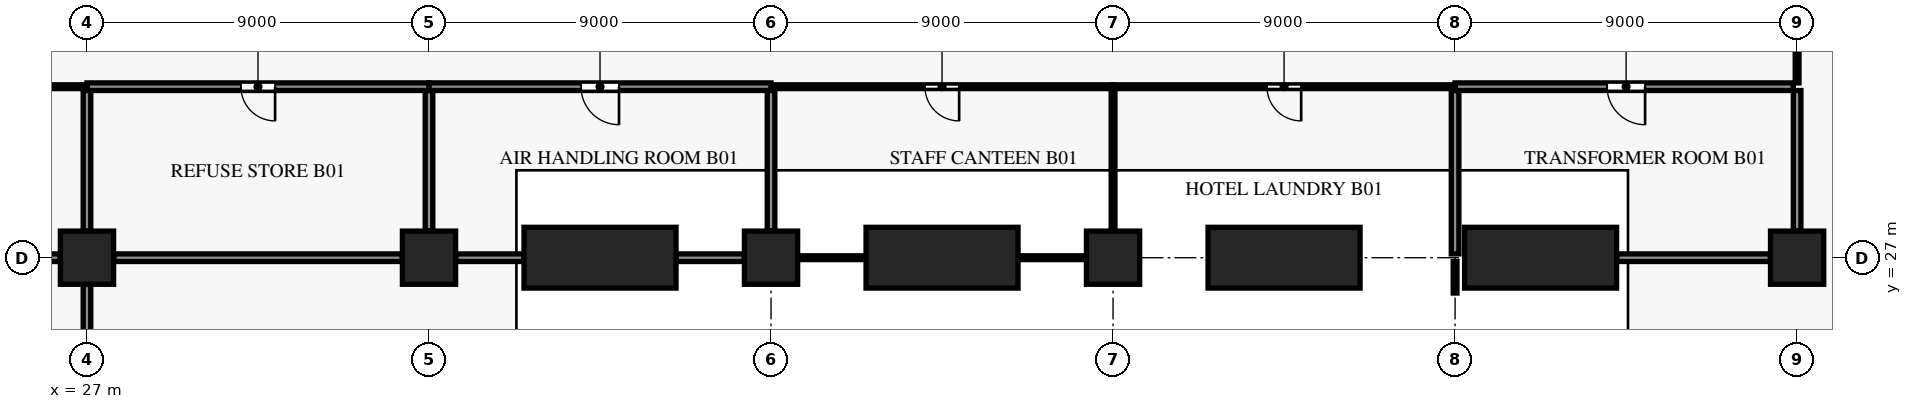
"""IFC4 building model, lengths in metres.
Left out: names, types, materials, properties, quantities, classifications, styles, units other than length and angle.
Written with IfcOpenShell. Run it as: python <this file> out.ifc"""

import sys

from ifc_helpers import new_model, si_unit, direction, frame, frame_2d, origin, origin_2d, place, context, subcontext, project, spatial, rectangle, extrude, element, fill, save


model = new_model("IFC4")
c1 = context("Model", 3, precision=1e-05, world=origin(), true_north=direction((0.0, 1.0)))
c2 = subcontext(c1, "Body", "Model", "MODEL_VIEW")
j1 = project(units=[si_unit("LENGTHUNIT", "METRE"), si_unit("PLANEANGLEUNIT", "RADIAN")], contexts=[c1])
p1 = place(None, origin())
s1 = spatial("IfcSite", under=j1, at=p1, CompositionType="ELEMENT")
p2 = place(p1, origin())
s2 = spatial("IfcBuilding", under=s1, at=p2, CompositionType="ELEMENT")
p3 = place(p2, frame((0.0, 0.0, -6.0)))
s3 = spatial("IfcBuildingStorey", under=s2, at=p3, CompositionType="ELEMENT", Elevation=-6.0)
p4 = place(p3, frame((27.0, 27.0, 0.0), z_axis=(0.0, 0.0, 1.0), x_axis=(1.0, 0.0, 0.0)))
e1 = element("IfcColumn", 1, at=p4, inside=s3, PredefinedType="COLUMN", context=c2, shape_type="SweptSolid", body=[
    extrude(rectangle(XDim=1.4, YDim=1.4, at=origin_2d()), origin(), (0.0, 0.0, 1.0), 6.0),
])
for number, where, z_axis, x_axis in (
    (2, (40.5, 27.0, 0.0), (0.0, 0.0, 1.0), (1.0, 0.0, 0.0)),
    (3, (49.5, 27.0, 0.0), (0.0, 0.0, 1.0), (1.0, 0.0, 0.0)),
    (4, (58.5, 27.0, 0.0), (0.0, 0.0, 1.0), (1.0, 0.0, 0.0)),
    (5, (65.25, 27.0, 0.0), (0.0, 0.0, 1.0), (1.0, 0.0, 0.0)),
):
    element("IfcColumn", number, at=place(p3, frame(where, z_axis=z_axis, x_axis=x_axis)), inside=s3, PredefinedType="COLUMN", context=c2, shape_type="SweptSolid", body=[
        extrude(rectangle(XDim=4.0, YDim=1.6, at=origin_2d()), origin(), (0.0, 0.0, 1.0), 6.0),
    ])
for number, where, z_axis, x_axis in (
    (6, (36.0, 27.0, 0.0), (0.0, 0.0, 1.0), (1.0, 0.0, 0.0)),
    (7, (45.0, 27.0, 0.0), (0.0, 0.0, 1.0), (1.0, 0.0, 0.0)),
    (8, (54.0, 27.0, 0.0), (0.0, 0.0, 1.0), (1.0, 0.0, 0.0)),
    (9, (72.0, 27.0, 0.0), (0.0, 0.0, 1.0), (1.0, 0.0, 0.0)),
):
    element("IfcColumn", number, at=place(p3, frame(where, z_axis=z_axis, x_axis=x_axis)), inside=s3, PredefinedType="COLUMN", context=c2, shape_type="SweptSolid", body=[
        extrude(rectangle(XDim=1.4, YDim=1.4, at=origin_2d()), origin(), (0.0, 0.0, 1.0), 6.0),
    ])
p5 = place(p3, frame((27.0, 26.295, 0.0), z_axis=(0.0, 0.0, 1.0), x_axis=(0.0, -1.0, 0.0)))
e10 = element("IfcWall", 10, at=p5, inside=s3, PredefinedType="PARTITIONING", context=c2, shape_type="SweptSolid", body=[
    extrude(rectangle(XDim=7.59, YDim=0.2, at=frame_2d((3.795, 0.0))), origin(), (0.0, 0.0, 1.0), 5.58),
])
p6 = place(p3, frame((63.0, 26.9, 0.0), z_axis=(0.0, 0.0, 1.0), x_axis=(0.0, -1.0, 0.0)))
e11 = element("IfcWall", 11, at=p6, inside=s3, PredefinedType="PARTITIONING", context=c2, shape_type="SweptSolid", body=[
    extrude(rectangle(XDim=0.83, YDim=0.1, at=frame_2d((0.415, 0.0))), origin(), (0.0, 0.0, 1.0), 5.58),
])
p7 = place(p3, frame((20.7, 27.0, 0.0), z_axis=(0.0, 0.0, 1.0), x_axis=(1.0, 0.0, 0.0)))
e12 = element("IfcWall", 12, at=p7, inside=s3, PredefinedType="PARTITIONING", context=c2, shape_type="SweptSolid", body=[
    extrude(rectangle(XDim=5.595, YDim=0.2, at=frame_2d((2.797, 0.0))), origin(), (0.0, 0.0, 1.0), 5.58),
])
p8 = place(p3, frame((35.295, 27.0, 0.0), z_axis=(0.0, 0.0, 1.0), x_axis=(-1.0, 0.0, 0.0)))
e13 = element("IfcWall", 13, at=p8, inside=s3, PredefinedType="PARTITIONING", context=c2, shape_type="SweptSolid", body=[
    extrude(rectangle(XDim=7.59, YDim=0.2, at=frame_2d((3.795, 0.0))), origin(), (0.0, 0.0, 1.0), 5.58),
])
for number, where, z_axis, x_axis in (
    (14, (38.495, 27.0, 0.0), (0.0, 0.0, 1.0), (-1.0, 0.0, 0.0)),
    (15, (44.295, 27.0, 0.0), (0.0, 0.0, 1.0), (-1.0, 0.0, 0.0)),
):
    element("IfcWall", number, at=place(p3, frame(where, z_axis=z_axis, x_axis=x_axis)), inside=s3, PredefinedType="PARTITIONING", context=c2, shape_type="SweptSolid", body=[
        extrude(rectangle(XDim=1.79, YDim=0.2, at=frame_2d((0.895, 0.0))), origin(), (0.0, 0.0, 1.0), 5.58),
    ])
for number, where, z_axis, x_axis in (
    (16, (47.495, 27.0, 0.0), (0.0, 0.0, 1.0), (-1.0, 0.0, 0.0)),
    (17, (53.295, 27.0, 0.0), (0.0, 0.0, 1.0), (-1.0, 0.0, 0.0)),
):
    element("IfcWall", number, at=place(p3, frame(where, z_axis=z_axis, x_axis=x_axis)), inside=s3, PredefinedType="PARTITIONING", context=c2, shape_type="SweptSolid", body=[
        extrude(rectangle(XDim=1.79, YDim=0.1, at=frame_2d((0.895, 0.0))), origin(), (0.0, 0.0, 1.0), 5.58),
    ])
p9 = place(p3, frame((71.295, 27.0, 0.0), z_axis=(0.0, 0.0, 1.0), x_axis=(-1.0, 0.0, 0.0)))
e18 = element("IfcWall", 18, at=p9, inside=s3, PredefinedType="PARTITIONING", context=c2, shape_type="SweptSolid", body=[
    extrude(rectangle(XDim=4.04, YDim=0.2, at=frame_2d((2.02, 0.0))), origin(), (0.0, 0.0, 1.0), 5.58),
])
p10 = place(p3, frame((27.0, 27.705, 0.0), z_axis=(0.0, 0.0, 1.0), x_axis=(0.0, 1.0, 0.0)))
e19 = element("IfcWall", 19, at=p10, inside=s3, PredefinedType="PARTITIONING", context=c2, shape_type="SweptSolid", body=[
    extrude(rectangle(XDim=3.695, YDim=0.2, at=frame_2d((1.847, 0.0))), origin(), (0.0, 0.0, 1.0), 5.58),
])
p11 = place(p3, frame((54.0, 27.705, 0.0), z_axis=(0.0, 0.0, 1.0), x_axis=(0.0, 1.0, 0.0)))
e20 = element("IfcWall", 20, at=p11, inside=s3, PredefinedType="PARTITIONING", context=c2, shape_type="SweptSolid", body=[
    extrude(rectangle(XDim=3.745, YDim=0.1, at=frame_2d((1.873, 0.0))), origin(), (0.0, 0.0, 1.0), 5.58),
])
for number, where, z_axis, x_axis in (
    (21, (36.0, 31.4, 0.0), (0.0, 0.0, 1.0), (0.0, -1.0, 0.0)),
    (22, (45.0, 31.4, 0.0), (0.0, 0.0, 1.0), (0.0, -1.0, 0.0)),
):
    element("IfcWall", number, at=place(p3, frame(where, z_axis=z_axis, x_axis=x_axis)), inside=s3, PredefinedType="PARTITIONING", context=c2, shape_type="SweptSolid", body=[
        extrude(rectangle(XDim=3.695, YDim=0.2, at=frame_2d((1.847, 0.0))), origin(), (0.0, 0.0, 1.0), 5.58),
    ])
p12 = place(p3, frame((63.0, 31.4, 0.0), z_axis=(0.0, 0.0, 1.0), x_axis=(0.0, -1.0, 0.0)))
e23 = element("IfcWall", 23, at=p12, inside=s3, PredefinedType="PARTITIONING", context=c2, shape_type="SweptSolid", body=[
    extrude(rectangle(XDim=4.3, YDim=0.2, at=frame_2d((2.15, 0.0))), origin(), (0.0, 0.0, 1.0), 5.58),
])
p13 = place(p3, frame((72.0, 31.4, 0.0), z_axis=(0.0, 0.0, 1.0), x_axis=(0.0, -1.0, 0.0)))
e24 = element("IfcWall", 24, at=p13, inside=s3, PredefinedType="PARTITIONING", context=c2, shape_type="SweptSolid", body=[
    extrude(rectangle(XDim=3.695, YDim=0.2, at=frame_2d((1.847, 0.0))), origin(), (0.0, 0.0, 1.0), 5.58),
])
p14 = place(p3, frame((27.0, 31.5, 0.0), z_axis=(0.0, 0.0, 1.0), x_axis=(-1.0, 0.0, 0.0)))
e25 = element("IfcWall", 25, at=p14, inside=s3, PredefinedType="PARTITIONING", context=c2, shape_type="SweptSolid", body=[
    extrude(rectangle(XDim=6.45, YDim=0.1, at=frame_2d((3.225, 0.0))), origin(), (0.0, 0.0, 1.0), 5.58),
])
p15 = place(p14, frame((2.75, 0.0, 0.0)))
e26 = element("IfcOpeningElement", 26, at=p15, cuts=e25, PredefinedType="OPENING", context=c2, shape_type="SweptSolid", body=[
    extrude(rectangle(XDim=0.9, YDim=2.1, at=frame_2d((0.45, 1.05))), frame((0.0, 0.06, 0.0), z_axis=(0.0, -1.0, 0.0), x_axis=(1.0, 0.0, 0.0)), (0.0, 0.0, 1.0), 0.12),
])
p16 = place(p3, frame((36.0, 31.5, 0.0), z_axis=(0.0, 0.0, 1.0), x_axis=(-1.0, 0.0, 0.0)))
e27 = element("IfcWall", 27, at=p16, inside=s3, PredefinedType="PARTITIONING", context=c2, shape_type="SweptSolid", body=[
    extrude(rectangle(XDim=9.0, YDim=0.2, at=frame_2d((4.5, 0.0))), origin(), (0.0, 0.0, 1.0), 5.58),
])
p17 = place(p16, frame((4.05, 0.0, 0.0)))
e28 = element("IfcOpeningElement", 28, at=p17, cuts=e27, PredefinedType="OPENING", context=c2, shape_type="SweptSolid", body=[
    extrude(rectangle(XDim=0.9, YDim=2.1, at=frame_2d((0.45, 1.05))), frame((0.0, 0.11, 0.0), z_axis=(0.0, -1.0, 0.0), x_axis=(1.0, 0.0, 0.0)), (0.0, 0.0, 1.0), 0.22),
])
p18 = place(p3, frame((45.0, 31.5, 0.0), z_axis=(0.0, 0.0, 1.0), x_axis=(-1.0, 0.0, 0.0)))
e29 = element("IfcWall", 29, at=p18, inside=s3, PredefinedType="PARTITIONING", context=c2, shape_type="SweptSolid", body=[
    extrude(rectangle(XDim=9.0, YDim=0.2, at=frame_2d((4.5, 0.0))), origin(), (0.0, 0.0, 1.0), 5.58),
])
p19 = place(p18, frame((4.0, 0.0, 0.0)))
e30 = element("IfcOpeningElement", 30, at=p19, cuts=e29, PredefinedType="OPENING", context=c2, shape_type="SweptSolid", body=[
    extrude(rectangle(XDim=1.0, YDim=2.1, at=frame_2d((0.5, 1.05))), frame((0.0, 0.11, 0.0), z_axis=(0.0, -1.0, 0.0), x_axis=(1.0, 0.0, 0.0)), (0.0, 0.0, 1.0), 0.22),
])
p20 = place(p3, frame((54.0, 31.5, 0.0), z_axis=(0.0, 0.0, 1.0), x_axis=(-1.0, 0.0, 0.0)))
e31 = element("IfcWall", 31, at=p20, inside=s3, PredefinedType="PARTITIONING", context=c2, shape_type="SweptSolid", body=[
    extrude(rectangle(XDim=9.0, YDim=0.1, at=frame_2d((4.5, 0.0))), origin(), (0.0, 0.0, 1.0), 5.58),
])
p21 = place(p20, frame((4.05, 0.0, 0.0)))
e32 = element("IfcOpeningElement", 32, at=p21, cuts=e31, PredefinedType="OPENING", context=c2, shape_type="SweptSolid", body=[
    extrude(rectangle(XDim=0.9, YDim=2.1, at=frame_2d((0.45, 1.05))), frame((0.0, 0.06, 0.0), z_axis=(0.0, -1.0, 0.0), x_axis=(1.0, 0.0, 0.0)), (0.0, 0.0, 1.0), 0.12),
])
p22 = place(p3, frame((63.0, 31.5, 0.0), z_axis=(0.0, 0.0, 1.0), x_axis=(-1.0, 0.0, 0.0)))
e33 = element("IfcWall", 33, at=p22, inside=s3, PredefinedType="PARTITIONING", context=c2, shape_type="SweptSolid", body=[
    extrude(rectangle(XDim=9.0, YDim=0.1, at=frame_2d((4.5, 0.0))), origin(), (0.0, 0.0, 1.0), 5.58),
])
p23 = place(p22, frame((4.05, 0.0, 0.0)))
e34 = element("IfcOpeningElement", 34, at=p23, cuts=e33, PredefinedType="OPENING", context=c2, shape_type="SweptSolid", body=[
    extrude(rectangle(XDim=0.9, YDim=2.1, at=frame_2d((0.45, 1.05))), frame((0.0, 0.06, 0.0), z_axis=(0.0, -1.0, 0.0), x_axis=(1.0, 0.0, 0.0)), (0.0, 0.0, 1.0), 0.12),
])
p24 = place(p3, frame((71.9, 31.5, 0.0), z_axis=(0.0, 0.0, 1.0), x_axis=(-1.0, 0.0, 0.0)))
e35 = element("IfcWall", 35, at=p24, inside=s3, PredefinedType="PARTITIONING", context=c2, shape_type="SweptSolid", body=[
    extrude(rectangle(XDim=8.9, YDim=0.2, at=frame_2d((4.45, 0.0))), origin(), (0.0, 0.0, 1.0), 5.58),
])
p25 = place(p24, frame((3.9, 0.0, 0.0)))
e36 = element("IfcOpeningElement", 36, at=p25, cuts=e35, PredefinedType="OPENING", context=c2, shape_type="SweptSolid", body=[
    extrude(rectangle(XDim=1.0, YDim=2.1, at=frame_2d((0.5, 1.05))), frame((0.0, 0.11, 0.0), z_axis=(0.0, -1.0, 0.0), x_axis=(1.0, 0.0, 0.0)), (0.0, 0.0, 1.0), 0.22),
])
p26 = place(p3, frame((72.0, 35.295, 0.0), z_axis=(0.0, 0.0, 1.0), x_axis=(0.0, -1.0, 0.0)))
e37 = element("IfcWall", 37, at=p26, inside=s3, PredefinedType="PARTITIONING", context=c2, shape_type="SweptSolid", body=[
    extrude(rectangle(XDim=3.695, YDim=0.1, at=frame_2d((1.847, 0.0))), origin(), (0.0, 0.0, 1.0), 5.58),
])
p27 = place(p23, origin())
e38 = element("IfcDoor", 38, at=p27, inside=s3, OperationType="SINGLE_SWING_RIGHT", PredefinedType="DOOR", context=c2, shape_type="SweptSolid", body=[
    extrude(rectangle(XDim=0.9, YDim=2.1, at=frame_2d((0.45, 1.05))), frame((0.0, 0.025, 0.0), z_axis=(0.0, -1.0, 0.0), x_axis=(1.0, 0.0, 0.0)), (0.0, 0.0, 1.0), 0.05),
])
fill(e34, e38)
p28 = place(p17, origin())
e39 = element("IfcDoor", 39, at=p28, inside=s3, OperationType="SINGLE_SWING_RIGHT", PredefinedType="DOOR", context=c2, shape_type="SweptSolid", body=[
    extrude(rectangle(XDim=0.9, YDim=2.1, at=frame_2d((0.45, 1.05))), frame((0.0, 0.025, 0.0), z_axis=(0.0, -1.0, 0.0), x_axis=(1.0, 0.0, 0.0)), (0.0, 0.0, 1.0), 0.05),
])
fill(e28, e39)
p29 = place(p19, origin())
e40 = element("IfcDoor", 40, at=p29, inside=s3, OperationType="SINGLE_SWING_RIGHT", PredefinedType="DOOR", context=c2, shape_type="SweptSolid", body=[
    extrude(rectangle(XDim=1.0, YDim=2.1, at=frame_2d((0.5, 1.05))), frame((0.0, 0.025, 0.0), z_axis=(0.0, -1.0, 0.0), x_axis=(1.0, 0.0, 0.0)), (0.0, 0.0, 1.0), 0.05),
])
fill(e30, e40)
p30 = place(p21, origin())
e41 = element("IfcDoor", 41, at=p30, inside=s3, OperationType="SINGLE_SWING_RIGHT", PredefinedType="DOOR", context=c2, shape_type="SweptSolid", body=[
    extrude(rectangle(XDim=0.9, YDim=2.1, at=frame_2d((0.45, 1.05))), frame((0.0, 0.025, 0.0), z_axis=(0.0, -1.0, 0.0), x_axis=(1.0, 0.0, 0.0)), (0.0, 0.0, 1.0), 0.05),
])
fill(e32, e41)
p31 = place(p25, origin())
e42 = element("IfcDoor", 42, at=p31, inside=s3, OperationType="SINGLE_SWING_RIGHT", PredefinedType="DOOR", context=c2, shape_type="SweptSolid", body=[
    extrude(rectangle(XDim=1.0, YDim=2.1, at=frame_2d((0.5, 1.05))), frame((0.0, 0.025, 0.0), z_axis=(0.0, -1.0, 0.0), x_axis=(1.0, 0.0, 0.0)), (0.0, 0.0, 1.0), 0.05),
])
fill(e36, e42)
save(model, sys.argv[1])
